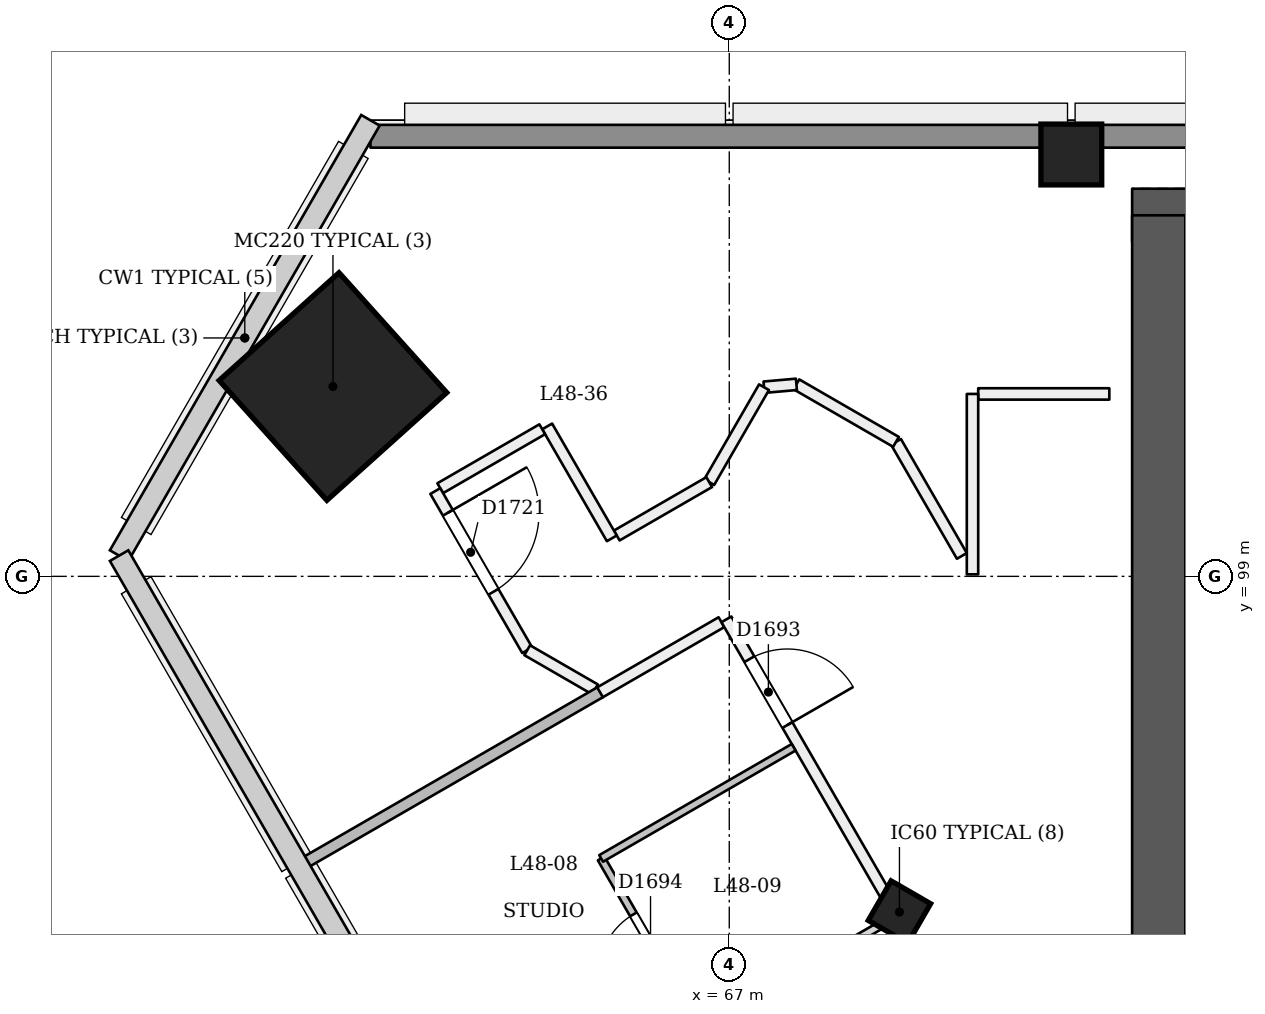
"""IFC4 building model, lengths in metres.
Left out: names, types, materials, properties, quantities, classifications, styles, units other than length and angle.
Written with IfcOpenShell. Run it as: python <this file> out.ifc"""

import sys

from ifc_helpers import new_model, si_unit, direction, frame, frame_2d, origin, origin_2d, place, context, subcontext, project, spatial, rectangle, extrude, element, fill, save


model = new_model("IFC4")
c1 = context("Model", 3, precision=1e-05, world=origin(), true_north=direction((0.0, 1.0)))
c2 = subcontext(c1, "Body", "Model", "MODEL_VIEW")
j1 = project(units=[si_unit("LENGTHUNIT", "METRE"), si_unit("PLANEANGLEUNIT", "RADIAN")], contexts=[c1])
p1 = place(None, origin())
s1 = spatial("IfcSite", under=j1, at=p1, CompositionType="ELEMENT")
p2 = place(p1, origin())
s2 = spatial("IfcBuilding", under=s1, at=p2, CompositionType="ELEMENT")
p3 = place(p2, frame((0.0, 0.0, 185.4)))
s3 = spatial("IfcBuildingStorey", under=s2, at=p3, CompositionType="ELEMENT", Elevation=185.4)
p4 = place(p3, frame((97.35, 103.75, 0.0), z_axis=(0.0, 0.0, 1.0), x_axis=(-1.0, 0.0, 0.0)))
e1 = element("IfcWall", 1, at=p4, inside=s3, PredefinedType="SHEAR", context=c2, shape_type="SweptSolid", body=[
    extrude(rectangle(XDim=25.05, YDim=0.7, at=frame_2d((12.525, 0.0))), origin(), (0.0, 0.0, 1.0), 3.6),
])
p5 = place(p3, frame((72.65, 103.75, 0.0), z_axis=(0.0, 0.0, 1.0), x_axis=(0.0, -1.0, 0.0)))
e2 = element("IfcWall", 2, at=p5, inside=s3, PredefinedType="SHEAR", context=c2, shape_type="SweptSolid", body=[
    extrude(rectangle(XDim=11.05, YDim=0.7, at=frame_2d((5.525, 0.0))), origin(), (0.0, 0.0, 1.0), 3.6),
])
p6 = place(p3, frame((69.212, 94.537, -0.018), z_axis=(0.022222852987, 0.038483477124, 0.999012095419), x_axis=(-0.86564203211, -0.499182083575, 0.038485317735)))
e3 = element("IfcColumn", 3, at=p6, inside=s3, PredefinedType="COLUMN", context=c2, shape_type="SweptSolid", body=[
    extrude(rectangle(XDim=0.6, YDim=0.6, at=origin_2d()), origin(), (0.0, 0.0, 1.0), 3.604),
])
p7 = place(p3, frame((61.752, 101.486, 0.0), z_axis=(0.028334066552, 0.009286524205, 0.999555371723), x_axis=(-0.866555685867, 0.498682266759, 0.019930883368)))
e4 = element("IfcColumn", 4, at=p7, inside=s3, PredefinedType="COLUMN", context=c2, shape_type="SweptSolid", body=[
    extrude(rectangle(XDim=2.12, YDim=2.12, at=origin_2d()), origin(), (0.0, 0.0, 1.0), 3.602),
])
p8 = place(p3, frame((71.5, 104.55, 0.0), z_axis=(0.0, 0.0, 1.0), x_axis=(1.0, 0.0, 0.0)))
e5 = element("IfcColumn", 5, at=p8, inside=s3, PredefinedType="COLUMN", context=c2, shape_type="SweptSolid", body=[
    extrude(rectangle(XDim=0.8, YDim=0.8, at=origin_2d()), origin(), (0.0, 0.0, 1.0), 3.6),
])
p9 = place(p3, frame((65.28, 97.463, 0.0), z_axis=(0.0, 0.0, 1.0), x_axis=(0.866046247233, 0.49996389635, 0.0)))
e6 = element("IfcWall", 6, at=p9, inside=s3, PredefinedType="PARTITIONING", context=c2, shape_type="SweptSolid", body=[
    extrude(rectangle(XDim=1.867, YDim=0.15, at=frame_2d((0.934, 0.0))), origin(), (0.0, 0.0, 1.0), 3.3),
])
p10 = place(p3, frame((66.962, 98.435, 0.0), z_axis=(0.0, 0.0, 1.0), x_axis=(0.499991148707, -0.866030514021, 0.0)))
e7 = element("IfcWall", 7, at=p10, inside=s3, PredefinedType="PARTITIONING", context=c2, shape_type="SweptSolid", body=[
    extrude(rectangle(XDim=6.476, YDim=0.15, at=frame_2d((3.238, 0.0))), origin(), (0.0, 0.0, 1.0), 2.9),
])
p11 = place(p10, frame((0.605, 0.0, 0.0)))
e8 = element("IfcOpeningElement", 8, at=p11, cuts=e7, PredefinedType="OPENING", context=c2, shape_type="SweptSolid", body=[
    extrude(rectangle(XDim=1.0, YDim=2.1, at=frame_2d((0.5, 1.05))), frame((0.0, 0.085, 0.0), z_axis=(0.0, -1.0, 0.0), x_axis=(1.0, 0.0, 0.0)), (0.0, 0.0, 1.0), 0.171),
])
p12 = place(p3, frame((72.0, 101.4, 0.0), z_axis=(0.0, 0.0, 1.0), x_axis=(-1.0, 0.0, 0.0)))
e9 = element("IfcWall", 9, at=p12, inside=s3, PredefinedType="PARTITIONING", context=c2, shape_type="SweptSolid", body=[
    extrude(rectangle(XDim=1.725, YDim=0.15, at=frame_2d((0.863, 0.0))), origin(), (0.0, 0.0, 1.0), 3.3),
])
p13 = place(p3, frame((70.2, 101.4, 0.0), z_axis=(0.0, 0.0, 1.0), x_axis=(0.0, -1.0, 0.0)))
e10 = element("IfcWall", 10, at=p13, inside=s3, PredefinedType="PARTITIONING", context=c2, shape_type="SweptSolid", body=[
    extrude(rectangle(XDim=2.374, YDim=0.15, at=frame_2d((1.187, 0.0))), origin(), (0.0, 0.0, 1.0), 3.3),
])
p14 = place(p3, frame((70.06, 99.269, 0.0), z_axis=(0.0, 0.0, 1.0), x_axis=(-0.500063959222, 0.865988473761, 0.0)))
e11 = element("IfcWall", 11, at=p14, inside=s3, PredefinedType="PARTITIONING", context=c2, shape_type="SweptSolid", body=[
    extrude(rectangle(XDim=1.733, YDim=0.15, at=frame_2d((0.866, 0.0))), origin(), (0.0, 0.0, 1.0), 3.3),
])
p15 = place(p3, frame((69.194, 100.769, 0.0), z_axis=(0.0, 0.0, 1.0), x_axis=(-0.865970650169, 0.500094824054, 0.0)))
e12 = element("IfcWall", 12, at=p15, inside=s3, PredefinedType="PARTITIONING", context=c2, shape_type="SweptSolid", body=[
    extrude(rectangle(XDim=1.513, YDim=0.15, at=frame_2d((0.757, 0.0))), origin(), (0.0, 0.0, 1.0), 3.3),
])
p16 = place(p3, frame((67.883, 101.526, 0.0), z_axis=(0.0, 0.0, 1.0), x_axis=(-0.996128379893, -0.087910470203, 0.0)))
e13 = element("IfcWall", 13, at=p16, inside=s3, PredefinedType="PARTITIONING", context=c2, shape_type="SweptSolid", body=[
    extrude(rectangle(XDim=0.428, YDim=0.15, at=frame_2d((0.214, 0.0))), origin(), (0.0, 0.0, 1.0), 3.3),
])
p17 = place(p3, frame((67.457, 101.489, 0.0), z_axis=(0.0, 0.0, 1.0), x_axis=(-0.4999813805, -0.866036153491, 0.0)))
e14 = element("IfcWall", 14, at=p17, inside=s3, PredefinedType="PARTITIONING", context=c2, shape_type="SweptSolid", body=[
    extrude(rectangle(XDim=1.442, YDim=0.15, at=frame_2d((0.721, 0.0))), origin(), (0.0, 0.0, 1.0), 3.3),
])
p18 = place(p3, frame((66.736, 100.24, 0.0), z_axis=(0.0, 0.0, 1.0), x_axis=(-0.866052428737, -0.499953188488, 0.0)))
e15 = element("IfcWall", 15, at=p18, inside=s3, PredefinedType="PARTITIONING", context=c2, shape_type="SweptSolid", body=[
    extrude(rectangle(XDim=1.405, YDim=0.15, at=frame_2d((0.702, 0.0))), origin(), (0.0, 0.0, 1.0), 3.3),
])
p19 = place(p3, frame((65.455, 99.5, 0.0), z_axis=(0.0, 0.0, 1.0), x_axis=(-0.500045565072, 0.86599909518, 0.0)))
e16 = element("IfcWall", 16, at=p19, inside=s3, PredefinedType="PARTITIONING", context=c2, shape_type="SweptSolid", body=[
    extrude(rectangle(XDim=1.7, YDim=0.15, at=frame_2d((0.85, 0.0))), origin(), (0.0, 0.0, 1.0), 3.3),
])
p20 = place(p3, frame((64.54, 100.935, 0.0), z_axis=(0.0, 0.0, 1.0), x_axis=(-0.865868105756, -0.50027234926, 0.0)))
e17 = element("IfcWall", 17, at=p20, inside=s3, PredefinedType="PARTITIONING", context=c2, shape_type="SweptSolid", body=[
    extrude(rectangle(XDim=1.55, YDim=0.15, at=frame_2d((0.775, 0.0))), origin(), (0.0, 0.0, 1.0), 3.3),
])
p21 = place(p3, frame((63.133, 100.122, 0.0), z_axis=(0.0, 0.0, 1.0), x_axis=(0.500005054149, -0.86602248575, 0.0)))
e18 = element("IfcWall", 18, at=p21, inside=s3, PredefinedType="PARTITIONING", context=c2, shape_type="SweptSolid", body=[
    extrude(rectangle(XDim=2.418, YDim=0.15, at=frame_2d((1.209, 0.0))), origin(), (0.0, 0.0, 1.0), 3.3),
])
p22 = place(p21, frame((0.33, 0.0, 0.0)))
e19 = element("IfcOpeningElement", 19, at=p22, cuts=e18, PredefinedType="OPENING", context=c2, shape_type="SweptSolid", body=[
    extrude(rectangle(XDim=1.2, YDim=2.1, at=frame_2d((0.6, 1.05))), frame((0.0, 0.085, 0.0), z_axis=(0.0, -1.0, 0.0), x_axis=(1.0, 0.0, 0.0)), (0.0, 0.0, 1.0), 0.171),
])
p23 = place(p3, frame((64.342, 98.028, 0.0), z_axis=(0.0, 0.0, 1.0), x_axis=(0.865988239976, -0.50006436408, 0.0)))
e20 = element("IfcWall", 20, at=p23, inside=s3, PredefinedType="PARTITIONING", context=c2, shape_type="SweptSolid", body=[
    extrude(rectangle(XDim=1.03, YDim=0.15, at=frame_2d((0.515, 0.0))), origin(), (0.0, 0.0, 1.0), 3.3),
])
p24 = place(p3, frame((67.914, 90.786, 0.0), z_axis=(0.0, 0.0, 1.0), x_axis=(-0.499971721724, 0.866041729639, 0.0)))
e21 = element("IfcWall", 21, at=p24, inside=s3, PredefinedType="PARTITIONING", context=c2, shape_type="SweptSolid", body=[
    extrude(rectangle(XDim=5.2, YDim=0.1, at=frame_2d((2.6, 0.0))), origin(), (0.0, 0.0, 1.0), 2.9),
])
p25 = place(p24, frame((3.45, 0.0, 0.0)))
e22 = element("IfcOpeningElement", 22, at=p25, cuts=e21, PredefinedType="OPENING", context=c2, shape_type="SweptSolid", body=[
    extrude(rectangle(XDim=0.9, YDim=2.1, at=frame_2d((0.45, 1.05))), frame((0.0, 0.061, 0.0), z_axis=(0.0, -1.0, 0.0), x_axis=(1.0, 0.0, 0.0)), (0.0, 0.0, 1.0), 0.121),
])
p26 = place(p24, frame((0.866, 0.0, 0.0)))
e23 = element("IfcOpeningElement", 23, at=p26, cuts=e21, PredefinedType="OPENING", context=c2, shape_type="SweptSolid", body=[
    extrude(rectangle(XDim=0.9, YDim=2.1, at=frame_2d((0.45, 1.05))), frame((0.0, 0.061, 0.0), z_axis=(0.0, -1.0, 0.0), x_axis=(1.0, 0.0, 0.0)), (0.0, 0.0, 1.0), 0.121),
])
p27 = place(p3, frame((65.314, 95.289, 0.0), z_axis=(0.0, 0.0, 1.0), x_axis=(0.866025730634, 0.499999433879, 0.0)))
e24 = element("IfcWall", 24, at=p27, inside=s3, PredefinedType="PARTITIONING", context=c2, shape_type="SweptSolid", body=[
    extrude(rectangle(XDim=2.925, YDim=0.1, at=frame_2d((1.462, 0.0))), origin(), (0.0, 0.0, 1.0), 3.3),
])
p28 = place(p3, frame((65.3, 97.475, 0.0), z_axis=(0.0, 0.0, 1.0), x_axis=(-0.866024802457, -0.500001041529, 0.0)))
e25 = element("IfcWall", 25, at=p28, inside=s3, PredefinedType="PARTITIONING", context=c2, shape_type="SweptSolid", body=[
    extrude(rectangle(XDim=4.501, YDim=0.15, at=frame_2d((2.25, 0.0))), origin(), (0.0, 0.0, 1.0), 3.3),
])
p29 = place(p3, frame((66.657, 93.062, 0.0), z_axis=(0.0, 0.0, 1.0), x_axis=(0.866018712932, 0.500011588718, 0.0)))
e26 = element("IfcWall", 26, at=p29, inside=s3, PredefinedType="PARTITIONING", context=c2, shape_type="SweptSolid", body=[
    extrude(rectangle(XDim=2.875, YDim=0.1, at=frame_2d((1.438, 0.0))), origin(), (0.0, 0.0, 1.0), 2.9),
])
p30 = place(p3, frame((62.279, 104.79, 0.0), z_axis=(0.0, 0.0, 1.0), x_axis=(1.0, 0.0, 0.0)))
e27 = element("IfcWall", 27, at=p30, inside=s3, PredefinedType="SOLIDWALL", context=c2, shape_type="SweptSolid", body=[
    extrude(rectangle(XDim=45.441, YDim=0.3, at=frame_2d((22.721, 0.0))), origin(), (0.0, 0.0, 1.0), 3.3),
])
p31 = place(p11, origin())
e28 = element("IfcDoor", 28, at=p31, inside=s3, OperationType="SINGLE_SWING_RIGHT", PredefinedType="NOTDEFINED", context=c2, shape_type="SweptSolid", body=[
    extrude(rectangle(XDim=1.0, YDim=2.1, at=frame_2d((0.5, 1.05))), frame((0.0, 0.025, 0.0), z_axis=(0.0, -1.0, 0.0), x_axis=(1.0, 0.0, 0.0)), (0.0, 0.0, 1.0), 0.05),
])
fill(e8, e28)
p32 = place(p25, origin())
e29 = element("IfcDoor", 29, at=p32, inside=s3, OperationType="SINGLE_SWING_LEFT", PredefinedType="NOTDEFINED", context=c2, shape_type="SweptSolid", body=[
    extrude(rectangle(XDim=0.9, YDim=2.1, at=frame_2d((0.45, 1.05))), frame((0.0, 0.025, 0.0), z_axis=(0.0, -1.0, 0.0), x_axis=(1.0, 0.0, 0.0)), (0.0, 0.0, 1.0), 0.05),
])
fill(e22, e29)
p33 = place(p22, origin())
e30 = element("IfcDoor", 30, at=p33, inside=s3, OperationType="SINGLE_SWING_LEFT", PredefinedType="NOTDEFINED", context=c2, shape_type="SweptSolid", body=[
    extrude(rectangle(XDim=1.2, YDim=2.1, at=frame_2d((0.6, 1.05))), frame((0.0, 0.025, 0.0), z_axis=(0.0, -1.0, 0.0), x_axis=(1.0, 0.0, 0.0)), (0.0, 0.0, 1.0), 0.05),
])
fill(e19, e30)
save(model, sys.argv[1])
